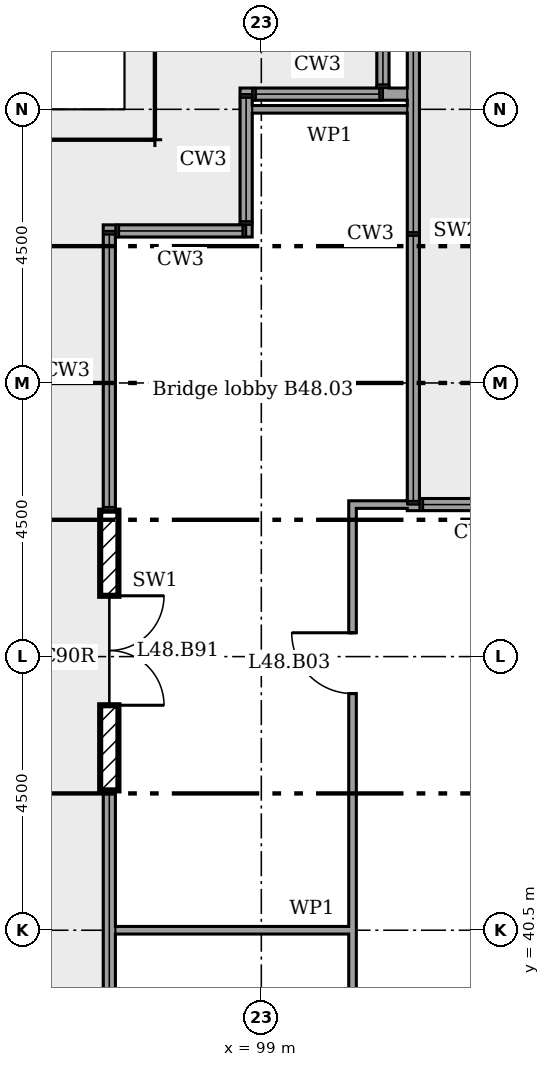
"""IFC4 building model, lengths in metres.
Left out: names, types, materials, properties, quantities, classifications, styles, units other than length and angle.
Written with IfcOpenShell. Run it as: python <this file> out.ifc"""

import sys

from ifc_helpers import new_model, si_unit, direction, frame, frame_2d, origin, place, context, subcontext, project, spatial, rectangle, extrude, element, fill, save


model = new_model("IFC4")
c1 = context("Model", 3, precision=1e-05, world=origin(), true_north=direction((0.0, 1.0)))
c2 = subcontext(c1, "Body", "Model", "MODEL_VIEW")
j1 = project(units=[si_unit("LENGTHUNIT", "METRE"), si_unit("PLANEANGLEUNIT", "RADIAN")], contexts=[c1])
p1 = place(None, origin())
s1 = spatial("IfcSite", under=j1, at=p1, CompositionType="ELEMENT")
p2 = place(p1, origin())
s2 = spatial("IfcBuilding", under=s1, at=p2, CompositionType="ELEMENT")
p3 = place(p2, frame((0.0, 0.0, 190.6)))
s3 = spatial("IfcBuildingStorey", under=s2, at=p3, CompositionType="ELEMENT", Elevation=190.6)
p4 = place(p3, frame((103.5, 47.5, 0.0), z_axis=(0.0, 0.0, 1.0), x_axis=(-1.0, 0.0, 0.0)))
e1 = element("IfcWall", 1, at=p4, inside=s3, PredefinedType="ELEMENTEDWALL", context=c2, shape_type="SweptSolid", body=[
    extrude(rectangle(XDim=2.1, YDim=0.2, at=frame_2d((1.05, 0.0))), origin(), (0.0, 0.0, 1.0), 1.8),
])
p5 = place(p3, frame((101.5, 47.6, 0.0), z_axis=(0.0, 0.0, 1.0), x_axis=(0.0, 1.0, 0.0)))
e2 = element("IfcWall", 2, at=p5, inside=s3, PredefinedType="ELEMENTEDWALL", context=c2, shape_type="SweptSolid", body=[
    extrude(rectangle(XDim=8.8, YDim=0.2, at=frame_2d((4.4, 0.0))), origin(), (0.0, 0.0, 1.0), 1.8),
])
p6 = place(p3, frame((101.0, 56.5, 0.0), z_axis=(0.0, 0.0, 1.0), x_axis=(0.0, -1.0, 0.0)))
e3 = element("IfcWall", 3, at=p6, inside=s3, PredefinedType="ELEMENTEDWALL", context=c2, shape_type="SweptSolid", body=[
    extrude(rectangle(XDim=2.15, YDim=0.2, at=frame_2d((1.075, 0.0))), origin(), (0.0, 0.0, 1.0), 1.8),
])
p7 = place(p3, frame((101.4, 54.25, 0.0), z_axis=(0.0, 0.0, 1.0), x_axis=(-1.0, 0.0, 0.0)))
e4 = element("IfcWall", 4, at=p7, inside=s3, PredefinedType="ELEMENTEDWALL", context=c2, shape_type="SweptSolid", body=[
    extrude(rectangle(XDim=2.75, YDim=0.2, at=frame_2d((1.375, 0.0))), origin(), (0.0, 0.0, 1.0), 1.8),
])
for number, where, z_axis, x_axis in (
    (5, (98.75, 54.15, 0.0), (0.0, 0.0, 1.0), (0.0, -1.0, 0.0)),
    (6, (98.65, 52.0, 0.0), (0.0, 0.0, 1.0), (-1.0, 0.0, 0.0)),
):
    element("IfcWall", number, at=place(p3, frame(where, z_axis=z_axis, x_axis=x_axis)), inside=s3, PredefinedType="ELEMENTEDWALL", context=c2, shape_type="SweptSolid", body=[
        extrude(rectangle(XDim=2.25, YDim=0.2, at=frame_2d((1.125, 0.0))), origin(), (0.0, 0.0, 1.0), 1.8),
    ])
p8 = place(p3, frame((96.5, 51.9, 0.0), z_axis=(0.0, 0.0, 1.0), x_axis=(0.0, -1.0, 0.0)))
e7 = element("IfcWall", 7, at=p8, inside=s3, PredefinedType="ELEMENTEDWALL", context=c2, shape_type="SweptSolid", body=[
    extrude(rectangle(XDim=4.5, YDim=0.2, at=frame_2d((2.25, 0.0))), origin(), (0.0, 0.0, 1.0), 1.8),
])
p9 = place(p3, frame((96.5, 42.8, 0.0), z_axis=(0.0, 0.0, 1.0), x_axis=(0.0, -1.0, 0.0)))
e8 = element("IfcWall", 8, at=p9, inside=s3, PredefinedType="ELEMENTEDWALL", context=c2, shape_type="SweptSolid", body=[
    extrude(rectangle(XDim=9.4, YDim=0.2, at=frame_2d((4.7, 0.0))), origin(), (0.0, 0.0, 1.0), 1.8),
])
p10 = place(p3, frame((96.5, 47.4, 0.0), z_axis=(0.0, 0.0, 1.0), x_axis=(0.0, -1.0, 0.0)))
e9 = element("IfcWall", 9, at=p10, inside=s3, PredefinedType="ELEMENTEDWALL", context=c2, shape_type="SweptSolid", body=[
    extrude(rectangle(XDim=4.6, YDim=0.3, at=frame_2d((2.3, 0.0))), origin(), (0.0, 0.0, 1.0), 4.85),
])
p11 = place(p10, frame((1.4, 0.0, 0.0)))
e10 = element("IfcOpeningElement", 10, at=p11, cuts=e9, PredefinedType="OPENING", context=c2, shape_type="SweptSolid", body=[
    extrude(rectangle(XDim=1.8, YDim=2.4, at=frame_2d((0.9, 1.2))), frame((0.0, 0.16, 0.0), z_axis=(0.0, -1.0, 0.0), x_axis=(1.0, 0.0, 0.0)), (0.0, 0.0, 1.0), 0.32),
])
p12 = place(p3, frame((96.6, 40.5, 0.0)))
e11 = element("IfcWall", 11, at=p12, inside=s3, PredefinedType="PARTITIONING", context=c2, shape_type="SweptSolid", body=[
    extrude(rectangle(XDim=3.9, YDim=0.125, at=frame_2d((1.95, 0.0))), origin(), (0.0, 0.0, 1.0), 4.251),
])
p13 = place(p3, frame((100.438, 47.5, 0.0)))
e12 = element("IfcWall", 12, at=p13, inside=s3, PredefinedType="PARTITIONING", context=c2, shape_type="SweptSolid", body=[
    extrude(rectangle(XDim=0.962, YDim=0.125, at=frame_2d((0.481, 0.0))), origin(), (0.0, 0.0, 1.0), 4.85),
])
p14 = place(p3, frame((98.85, 54.0, 0.0)))
e13 = element("IfcWall", 13, at=p14, inside=s3, PredefinedType="PARTITIONING", context=c2, shape_type="SweptSolid", body=[
    extrude(rectangle(XDim=2.55, YDim=0.125, at=frame_2d((1.275, 0.0))), origin(), (0.0, 0.0, 1.0), 4.321),
])
p15 = place(p3, frame((100.5, 34.262, 0.0), z_axis=(0.0, 0.0, 1.0), x_axis=(0.0, 1.0, 0.0)))
e14 = element("IfcWall", 14, at=p15, inside=s3, PredefinedType="PARTITIONING", context=c2, shape_type="SweptSolid", body=[
    extrude(rectangle(XDim=13.175, YDim=0.125, at=frame_2d((6.587, 0.0))), origin(), (0.0, 0.0, 1.0), 4.85),
])
p16 = place(p15, frame((2.488, 0.0, 0.0)))
e15 = element("IfcOpeningElement", 15, at=p16, cuts=e14, PredefinedType="OPENING", context=c2, shape_type="SweptSolid", body=[
    extrude(rectangle(XDim=1.2, YDim=2.1, at=frame_2d((0.6, 1.05))), frame((0.0, 0.073, 0.0), z_axis=(0.0, -1.0, 0.0), x_axis=(1.0, 0.0, 0.0)), (0.0, 0.0, 1.0), 0.145),
])
p17 = place(p15, frame((10.129, 0.0, 0.0)))
e16 = element("IfcOpeningElement", 16, at=p17, cuts=e14, PredefinedType="OPENING", context=c2, shape_type="SweptSolid", body=[
    extrude(rectangle(XDim=1.0, YDim=2.1, at=frame_2d((0.5, 1.05))), frame((0.0, 0.073, 0.0), z_axis=(0.0, -1.0, 0.0), x_axis=(1.0, 0.0, 0.0)), (0.0, 0.0, 1.0), 0.145),
])
p18 = place(p11, origin())
e17 = element("IfcDoor", 17, at=p18, inside=s3, OperationType="DOUBLE_DOOR_DOUBLE_SWING", PredefinedType="NOTDEFINED", context=c2, shape_type="SweptSolid", body=[
    extrude(rectangle(XDim=1.8, YDim=2.4, at=frame_2d((0.9, 1.2))), frame((0.0, 0.025, 0.0), z_axis=(0.0, -1.0, 0.0), x_axis=(1.0, 0.0, 0.0)), (0.0, 0.0, 1.0), 0.05),
])
fill(e10, e17)
p19 = place(p17, origin())
e18 = element("IfcDoor", 18, at=p19, inside=s3, OperationType="SINGLE_SWING_LEFT", PredefinedType="DOOR", context=c2, shape_type="SweptSolid", body=[
    extrude(rectangle(XDim=1.0, YDim=2.1, at=frame_2d((0.5, 1.05))), frame((0.0, 0.025, 0.0), z_axis=(0.0, -1.0, 0.0), x_axis=(1.0, 0.0, 0.0)), (0.0, 0.0, 1.0), 0.05),
])
fill(e16, e18)
save(model, sys.argv[1])
